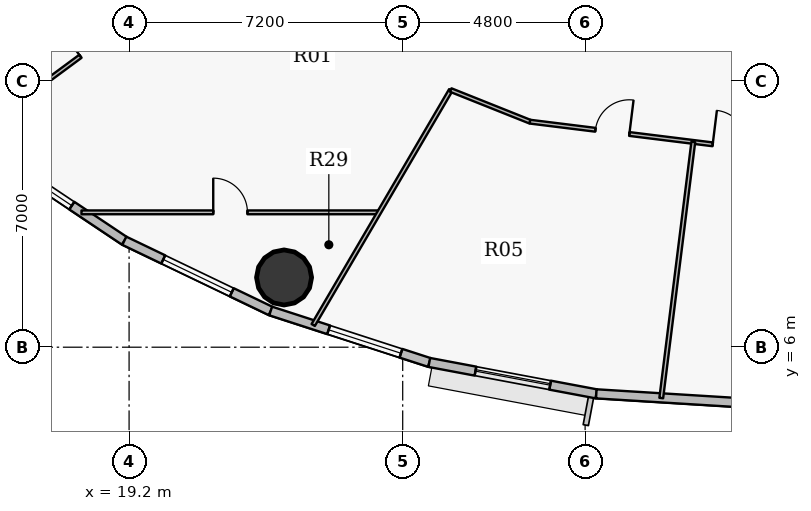
"""IFC4 building model, lengths in metres.
Left out: names, types, materials, properties, quantities, classifications, styles, units other than length and angle.
Written with IfcOpenShell. Run it as: python <this file> out.ifc"""

import sys

from ifc_helpers import new_model, si_unit, direction, frame, frame_2d, origin, origin_2d, place, context, subcontext, project, spatial, rectangle, hollow_circle, extrude, source, transform, mapped, element, fill, save


model = new_model("IFC4")
c1 = context("Model", 3, precision=1e-05, world=origin(), true_north=direction((0.0, 1.0)))
c2 = subcontext(c1, "Body", "Model", "MODEL_VIEW")
j1 = project(units=[si_unit("LENGTHUNIT", "METRE"), si_unit("PLANEANGLEUNIT", "RADIAN")], contexts=[c1])
p1 = place(None, origin())
s1 = spatial("IfcSite", under=j1, at=p1, CompositionType="ELEMENT")
p2 = place(p1, origin())
s2 = spatial("IfcBuilding", under=s1, at=p2, CompositionType="ELEMENT")
p3 = place(p2, frame((0.0, 0.0, 127.2)))
s3 = spatial("IfcBuildingStorey", under=s2, at=p3, CompositionType="ELEMENT", Elevation=127.2)
p4 = place(p3, frame((23.278, 7.835, 0.0), z_axis=(0.0, 0.0, 1.0), x_axis=(1.0, 0.0, 0.0)))
e1 = element("IfcColumn", 1, at=p4, inside=s3, PredefinedType="COLUMN", context=c2, shape_type="SweptSolid", body=[
    extrude(hollow_circle(Radius=0.725, WallThickness=0.042, at=origin_2d()), origin(), (0.0, 0.0, 1.0), 3.75),
])
p5 = place(p3, frame((19.075, 8.801, 0.0), z_axis=(0.0, 0.0, 1.0), x_axis=(-0.831221811447, 0.555940914284, 0.0)))
e2 = element("IfcWall", 2, at=p5, inside=s3, PredefinedType="SOLIDWALL", context=c2, shape_type="SweptSolid", body=[
    extrude(rectangle(XDim=4.13, YDim=0.24, at=frame_2d((2.065, 0.0))), origin(), (0.0, 0.0, 1.0), 3.5),
])
p6 = place(p5, frame((1.663, 0.0, 0.9)))
e3 = element("IfcOpeningElement", 3, at=p6, cuts=e2, PredefinedType="OPENING", context=c2, shape_type="SweptSolid", body=[
    extrude(rectangle(XDim=1.25, YDim=1.65, at=origin_2d()), frame((0.625, 0.13, 0.825), z_axis=(0.0, -1.0, 0.0), x_axis=(1.0, 0.0, 0.0)), (0.0, 0.0, 1.0), 0.26),
])
p7 = place(p3, frame((22.926, 6.953, 0.0), z_axis=(0.0, 0.0, 1.0), x_axis=(-0.901589935876, 0.432591709962, 0.0)))
e4 = element("IfcWall", 4, at=p7, inside=s3, PredefinedType="SOLIDWALL", context=c2, shape_type="SweptSolid", body=[
    extrude(rectangle(XDim=4.272, YDim=0.24, at=frame_2d((2.136, 0.0))), origin(), (0.0, 0.0, 1.0), 3.5),
])
p8 = place(p7, frame((1.136, 0.0, 0.9)))
e5 = element("IfcOpeningElement", 5, at=p8, cuts=e4, PredefinedType="OPENING", context=c2, shape_type="SweptSolid", body=[
    extrude(rectangle(XDim=2.0, YDim=1.75, at=origin_2d()), frame((1.0, 0.13, 0.875), z_axis=(0.0, -1.0, 0.0), x_axis=(1.0, 0.0, 0.0)), (0.0, 0.0, 1.0), 0.26),
])
p9 = place(p3, frame((27.1, 5.599, 0.0), z_axis=(0.0, 0.0, 1.0), x_axis=(-0.951211346073, 0.308540070495, 0.0)))
e6 = element("IfcWall", 6, at=p9, inside=s3, PredefinedType="SOLIDWALL", context=c2, shape_type="SweptSolid", body=[
    extrude(rectangle(XDim=4.388, YDim=0.24, at=frame_2d((2.194, 0.0))), origin(), (0.0, 0.0, 1.0), 3.5),
])
p10 = place(p9, frame((0.785, 0.0, 0.9)))
e7 = element("IfcOpeningElement", 7, at=p10, cuts=e6, PredefinedType="OPENING", context=c2, shape_type="SweptSolid", body=[
    extrude(rectangle(XDim=2.0, YDim=1.75, at=origin_2d()), frame((1.0, 0.13, 0.875), z_axis=(0.0, -1.0, 0.0), x_axis=(1.0, 0.0, 0.0)), (0.0, 0.0, 1.0), 0.26),
])
p11 = place(p3, frame((31.494, 4.773, 0.0), z_axis=(0.0, 0.0, 1.0), x_axis=(-0.982789252177, 0.184730305596, 0.0)))
e8 = element("IfcWall", 8, at=p11, inside=s3, PredefinedType="SOLIDWALL", context=c2, shape_type="SweptSolid", body=[
    extrude(rectangle(XDim=4.471, YDim=0.24, at=frame_2d((2.235, 0.0))), origin(), (0.0, 0.0, 1.0), 3.5),
])
p12 = place(p11, frame((1.236, 0.0, 0.9)))
e9 = element("IfcOpeningElement", 9, at=p12, cuts=e8, PredefinedType="OPENING", context=c2, shape_type="SweptSolid", body=[
    extrude(rectangle(XDim=2.0, YDim=1.75, at=origin_2d()), frame((1.0, 0.13, 0.875), z_axis=(0.0, -1.0, 0.0), x_axis=(1.0, 0.0, 0.0)), (0.0, 0.0, 1.0), 0.26),
])
p13 = place(p3, frame((36.0, 4.495, 0.0), z_axis=(0.0, 0.0, 1.0), x_axis=(-0.998107531589, 0.061492726276, 0.0)))
e10 = element("IfcWall", 10, at=p13, inside=s3, PredefinedType="SOLIDWALL", context=c2, shape_type="SweptSolid", body=[
    extrude(rectangle(XDim=4.514, YDim=0.24, at=frame_2d((2.257, 0.0))), origin(), (0.0, 0.0, 1.0), 3.5),
])
p14 = place(p3, frame((15.108, 11.579, 0.0), z_axis=(0.0, 0.0, 1.0), x_axis=(0.804563867784, 0.593866131932, 0.0)))
e11 = element("IfcWall", 11, at=p14, inside=s3, PredefinedType="PARTITIONING", context=c2, shape_type="SweptSolid", body=[
    extrude(rectangle(XDim=7.887, YDim=0.1, at=frame_2d((3.944, 0.0))), origin(), (0.0, 0.0, 1.0), 2.935),
])
p15 = place(p14, frame((3.494, 0.0, 0.0)))
e12 = element("IfcOpeningElement", 12, at=p15, cuts=e11, PredefinedType="OPENING", context=c2, shape_type="SweptSolid", body=[
    extrude(rectangle(XDim=0.9, YDim=2.1, at=origin_2d()), frame((0.45, 0.06, 1.05), z_axis=(0.0, -1.0, 0.0), x_axis=(1.0, 0.0, 0.0)), (0.0, 0.0, 1.0), 0.12),
])
p16 = place(p3, frame((17.948, 9.548, 0.0), z_axis=(0.0, 0.0, 1.0), x_axis=(1.0, 0.0, 0.0)))
e13 = element("IfcWall", 13, at=p16, inside=s3, PredefinedType="PARTITIONING", context=c2, shape_type="SweptSolid", body=[
    extrude(rectangle(XDim=7.833, YDim=0.1, at=frame_2d((3.917, 0.0))), origin(), (0.0, 0.0, 1.0), 2.935),
])
p17 = place(p16, frame((3.467, 0.0, 0.0)))
e14 = element("IfcOpeningElement", 14, at=p17, cuts=e13, PredefinedType="OPENING", context=c2, shape_type="SweptSolid", body=[
    extrude(rectangle(XDim=0.9, YDim=2.1, at=origin_2d()), frame((0.45, 0.06, 1.05), z_axis=(0.0, -1.0, 0.0), x_axis=(1.0, 0.0, 0.0)), (0.0, 0.0, 1.0), 0.12),
])
p18 = place(p3, frame((24.045, 6.584, 0.0), z_axis=(0.0, 0.0, 1.0), x_axis=(0.505283833512, 0.862953212863, 0.0)))
e15 = element("IfcWall", 15, at=p18, inside=s3, PredefinedType="PARTITIONING", context=c2, shape_type="SweptSolid", body=[
    extrude(rectangle(XDim=7.163, YDim=0.1, at=frame_2d((3.582, 0.0))), origin(), (0.0, 0.0, 1.0), 2.935),
])
p19 = place(p3, frame((27.665, 12.766, 0.0), z_axis=(0.0, 0.0, 1.0), x_axis=(0.928814037075, -0.370546197568, 0.0)))
e16 = element("IfcWall", 16, at=p19, inside=s3, PredefinedType="PARTITIONING", context=c2, shape_type="SweptSolid", body=[
    extrude(rectangle(XDim=2.243, YDim=0.1, at=frame_2d((1.122, 0.0))), origin(), (0.0, 0.0, 1.0), 3.5),
])
p20 = place(p3, frame((29.749, 11.934, 0.0), z_axis=(0.0, 0.0, 1.0), x_axis=(0.992395485088, -0.123090215599, 0.0)))
e17 = element("IfcWall", 17, at=p20, inside=s3, PredefinedType="PARTITIONING", context=c2, shape_type="SweptSolid", body=[
    extrude(rectangle(XDim=6.299, YDim=0.1, at=frame_2d((3.15, 0.0))), origin(), (0.0, 0.0, 1.0), 2.935),
])
p21 = place(p20, frame((1.736, 0.0, 0.0)))
e18 = element("IfcOpeningElement", 18, at=p21, cuts=e17, PredefinedType="OPENING", context=c2, shape_type="SweptSolid", body=[
    extrude(rectangle(XDim=0.9, YDim=2.1, at=origin_2d()), frame((0.45, 0.06, 1.05), z_axis=(0.0, -1.0, 0.0), x_axis=(1.0, 0.0, 0.0)), (0.0, 0.0, 1.0), 0.12),
])
p22 = place(p20, frame((4.845, 0.0, 0.0)))
e19 = element("IfcOpeningElement", 19, at=p22, cuts=e17, PredefinedType="OPENING", context=c2, shape_type="SweptSolid", body=[
    extrude(rectangle(XDim=0.9, YDim=2.1, at=origin_2d()), frame((0.45, 0.06, 1.05), z_axis=(0.0, -1.0, 0.0), x_axis=(1.0, 0.0, 0.0)), (0.0, 0.0, 1.0), 0.12),
])
p23 = place(p3, frame((33.204, 4.662, 0.0), z_axis=(0.0, 0.0, 1.0), x_axis=(0.124202862254, 0.992256846289, 0.0)))
e20 = element("IfcWall", 20, at=p23, inside=s3, PredefinedType="PARTITIONING", context=c2, shape_type="SweptSolid", body=[
    extrude(rectangle(XDim=6.791, YDim=0.1, at=frame_2d((3.396, 0.0))), origin(), (0.0, 0.0, 1.0), 2.935),
])
m1 = source(origin(), c2, "Body", "SweptSolid", [
    extrude(rectangle(XDim=2.0, YDim=1.75, at=origin_2d()), frame((1.0, 0.03, 0.875), z_axis=(0.0, -1.0, 0.0), x_axis=(1.0, 0.0, 0.0)), (0.0, 0.0, 1.0), 0.06),
])
p24 = place(p8, origin())
e21 = element("IfcWindow", 21, at=p24, inside=s3, PartitioningType="DOUBLE_PANEL_VERTICAL", PredefinedType="WINDOW", context=c2, shape_type="MappedRepresentation", body=[
    mapped(m1, transform((0.0, 0.0, 0.0), x_axis=(1.0, 0.0, 0.0), y_axis=(0.0, 1.0, 0.0), z_axis=(0.0, 0.0, 1.0), scale=1.0)),
])
fill(e5, e21)
p25 = place(p10, origin())
e22 = element("IfcWindow", 22, at=p25, inside=s3, PartitioningType="DOUBLE_PANEL_VERTICAL", PredefinedType="WINDOW", context=c2, shape_type="MappedRepresentation", body=[
    mapped(m1, transform((0.0, 0.0, 0.0), x_axis=(1.0, 0.0, 0.0), y_axis=(0.0, 1.0, 0.0), z_axis=(0.0, 0.0, 1.0), scale=1.0)),
])
fill(e7, e22)
p26 = place(p12, origin())
e23 = element("IfcWindow", 23, at=p26, inside=s3, PartitioningType="DOUBLE_PANEL_VERTICAL", PredefinedType="WINDOW", context=c2, shape_type="MappedRepresentation", body=[
    mapped(m1, transform((0.0, 0.0, 0.0), x_axis=(1.0, 0.0, 0.0), y_axis=(0.0, 1.0, 0.0), z_axis=(0.0, 0.0, 1.0), scale=1.0)),
])
fill(e9, e23)
m2 = source(origin(), c2, "Body", "SweptSolid", [
    extrude(rectangle(XDim=1.25, YDim=1.65, at=origin_2d()), frame((0.625, 0.03, 0.825), z_axis=(0.0, -1.0, 0.0), x_axis=(1.0, 0.0, 0.0)), (0.0, 0.0, 1.0), 0.06),
])
p27 = place(p6, origin())
e24 = element("IfcWindow", 24, at=p27, inside=s3, PartitioningType="SINGLE_PANEL", PredefinedType="WINDOW", context=c2, shape_type="MappedRepresentation", body=[
    mapped(m2, transform((0.0, 0.0, 0.0), x_axis=(1.0, 0.0, 0.0), y_axis=(0.0, 1.0, 0.0), z_axis=(0.0, 0.0, 1.0), scale=1.0)),
])
fill(e3, e24)
m3 = source(origin(), c2, "Body", "SweptSolid", [
    extrude(rectangle(XDim=0.9, YDim=2.1, at=origin_2d()), frame((0.45, 0.025, 1.05), z_axis=(0.0, -1.0, 0.0), x_axis=(1.0, 0.0, 0.0)), (0.0, 0.0, 1.0), 0.05),
])
p28 = place(p15, origin())
e25 = element("IfcDoor", 25, at=p28, inside=s3, OperationType="SINGLE_SWING_LEFT", PredefinedType="DOOR", context=c2, shape_type="MappedRepresentation", body=[
    mapped(m3, transform((0.0, 0.0, 0.0), x_axis=(1.0, 0.0, 0.0), y_axis=(0.0, 1.0, 0.0), z_axis=(0.0, 0.0, 1.0), scale=1.0)),
])
fill(e12, e25)
p29 = place(p21, origin())
e26 = element("IfcDoor", 26, at=p29, inside=s3, OperationType="SINGLE_SWING_RIGHT", PredefinedType="DOOR", context=c2, shape_type="MappedRepresentation", body=[
    mapped(m3, transform((0.0, 0.0, 0.0), x_axis=(1.0, 0.0, 0.0), y_axis=(0.0, 1.0, 0.0), z_axis=(0.0, 0.0, 1.0), scale=1.0)),
])
fill(e18, e26)
p30 = place(p22, origin())
e27 = element("IfcDoor", 27, at=p30, inside=s3, OperationType="SINGLE_SWING_LEFT", PredefinedType="DOOR", context=c2, shape_type="MappedRepresentation", body=[
    mapped(m3, transform((0.0, 0.0, 0.0), x_axis=(1.0, 0.0, 0.0), y_axis=(0.0, 1.0, 0.0), z_axis=(0.0, 0.0, 1.0), scale=1.0)),
])
fill(e19, e27)
p31 = place(p17, origin())
e28 = element("IfcDoor", 28, at=p31, inside=s3, OperationType="SINGLE_SWING_LEFT", PredefinedType="DOOR", context=c2, shape_type="MappedRepresentation", body=[
    mapped(m3, transform((0.0, 0.0, 0.0), x_axis=(1.0, 0.0, 0.0), y_axis=(0.0, 1.0, 0.0), z_axis=(0.0, 0.0, 1.0), scale=1.0)),
])
fill(e14, e28)
save(model, sys.argv[1])
